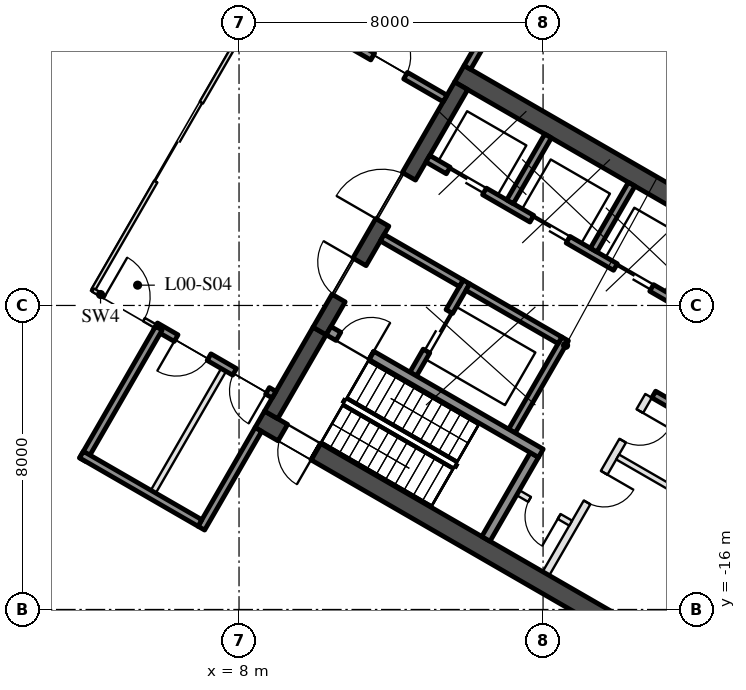
"""IFC4 building model, lengths in metres.
Left out: names, types, materials, properties, quantities, classifications, styles, units other than length and angle.
Written with IfcOpenShell. Run it as: python <this file> out.ifc"""

import sys

from ifc_helpers import new_model, si_unit, direction, frame, frame_2d, origin, origin_2d, place, context, subcontext, project, spatial, rectangle, extrude, element, fill, save


model = new_model("IFC4")
c1 = context("Model", 3, precision=1e-05, world=origin(), true_north=direction((0.0, 1.0)))
c2 = subcontext(c1, "Body", "Model", "MODEL_VIEW")
j1 = project(units=[si_unit("LENGTHUNIT", "METRE"), si_unit("PLANEANGLEUNIT", "RADIAN")], contexts=[c1])
p1 = place(None, origin())
s1 = spatial("IfcSite", under=j1, at=p1, CompositionType="ELEMENT")
p2 = place(p1, origin())
s2 = spatial("IfcBuilding", under=s1, at=p2, CompositionType="ELEMENT")
p3 = place(p2, origin())
s3 = spatial("IfcBuildingStorey", under=s2, at=p3, CompositionType="ELEMENT", Elevation=0.0)
p4 = place(p3, frame((13.797, -1.903, 0.0), z_axis=(0.0, 0.0, 1.0), x_axis=(0.866024264262, -0.500001973705, 0.0)))
e1 = element("IfcWall", 1, at=p4, inside=s3, PredefinedType="SHEAR", context=c2, shape_type="SweptSolid", body=[
    extrude(rectangle(XDim=15.6, YDim=0.5, at=frame_2d((7.8, 0.0))), origin(), (0.0, 0.0, 1.0), 8.7),
])
p5 = place(p3, frame((14.496, -14.143, 0.0), z_axis=(0.0, 0.0, 1.0), x_axis=(0.500062241894, 0.865989465428, 0.0)))
e2 = element("IfcWall", 2, at=p5, inside=s3, PredefinedType="SHEAR", context=c2, shape_type="SweptSolid", body=[
    extrude(rectangle(XDim=2.55, YDim=0.25, at=frame_2d((1.275, 0.0))), origin(), (0.0, 0.0, 1.0), 8.7),
])
p6 = place(p3, frame((15.181, -11.305, 0.0), z_axis=(0.0, 0.0, 1.0), x_axis=(0.49994636267, 0.866056369097, 0.0)))
e3 = element("IfcWall", 3, at=p6, inside=s3, PredefinedType="SHEAR", context=c2, shape_type="SweptSolid", body=[
    extrude(rectangle(XDim=2.8, YDim=0.2, at=frame_2d((1.4, 0.0))), origin(), (0.0, 0.0, 1.0), 8.7),
])
p7 = place(p3, frame((12.583, -9.805, 0.0), z_axis=(0.0, 0.0, 1.0), x_axis=(0.49994636267, 0.866056369097, 0.0)))
e4 = element("IfcWall", 4, at=p7, inside=s3, PredefinedType="SHEAR", context=c2, shape_type="SweptSolid", body=[
    extrude(rectangle(XDim=2.8, YDim=0.2, at=frame_2d((1.4, 0.0))), origin(), (0.0, 0.0, 1.0), 8.7),
])
p8 = place(p7, frame((0.7, 0.0, 0.0)))
e5 = element("IfcOpeningElement", 5, at=p8, cuts=e4, PredefinedType="OPENING", context=c2, shape_type="SweptSolid", body=[
    extrude(rectangle(XDim=1.2, YDim=2.1, at=frame_2d((0.6, 1.05))), frame((0.0, 0.11, 0.0), z_axis=(0.0, -1.0, 0.0), x_axis=(1.0, 0.0, 0.0)), (0.0, 0.0, 1.0), 0.22),
])
p9 = place(p3, frame((11.768, -6.217, 0.0), z_axis=(0.0, 0.0, 1.0), x_axis=(0.866050077142, -0.499957262057, 0.0)))
e6 = element("IfcWall", 6, at=p9, inside=s3, PredefinedType="SHEAR", context=c2, shape_type="SweptSolid", body=[
    extrude(rectangle(XDim=2.4, YDim=0.2, at=frame_2d((1.2, 0.0))), origin(), (0.0, 0.0, 1.0), 8.7),
])
p10 = place(p3, frame((14.02, -7.517, 0.0), z_axis=(0.0, 0.0, 1.0), x_axis=(0.866034573852, -0.49998411664, 0.0)))
e7 = element("IfcWall", 7, at=p10, inside=s3, PredefinedType="SHEAR", context=c2, shape_type="SweptSolid", body=[
    extrude(rectangle(XDim=2.8, YDim=0.2, at=frame_2d((1.4, 0.0))), origin(), (0.0, 0.0, 1.0), 8.7),
])
p11 = place(p3, frame((12.968, -4.138, 0.0), z_axis=(0.0, 0.0, 1.0), x_axis=(0.866028328073, -0.49999493495, 0.0)))
e8 = element("IfcWall", 8, at=p11, inside=s3, PredefinedType="SHEAR", context=c2, shape_type="SweptSolid", body=[
    extrude(rectangle(XDim=10.16, YDim=0.2, at=frame_2d((5.08, 0.0))), origin(), (0.0, 0.0, 1.0), 8.7),
])
p12 = place(p11, frame((0.62, 0.0, 0.0)))
e9 = element("IfcOpeningElement", 9, at=p12, cuts=e8, PredefinedType="OPENING", context=c2, shape_type="SweptSolid", body=[
    extrude(rectangle(XDim=1.1, YDim=2.1, at=frame_2d((0.55, 1.05))), frame((0.0, 0.11, 0.0), z_axis=(0.0, -1.0, 0.0), x_axis=(1.0, 0.0, 0.0)), (0.0, 0.0, 1.0), 0.22),
])
p13 = place(p11, frame((3.16, 0.0, 0.0)))
e10 = element("IfcOpeningElement", 10, at=p13, cuts=e8, PredefinedType="OPENING", context=c2, shape_type="SweptSolid", body=[
    extrude(rectangle(XDim=1.1, YDim=2.1, at=frame_2d((0.55, 1.05))), frame((0.0, 0.11, 0.0), z_axis=(0.0, -1.0, 0.0), x_axis=(1.0, 0.0, 0.0)), (0.0, 0.0, 1.0), 0.22),
])
p14 = place(p11, frame((5.7, 0.0, 0.0)))
e11 = element("IfcOpeningElement", 11, at=p14, cuts=e8, PredefinedType="OPENING", context=c2, shape_type="SweptSolid", body=[
    extrude(rectangle(XDim=1.1, YDim=2.1, at=frame_2d((0.55, 1.05))), frame((0.0, 0.11, 0.0), z_axis=(0.0, -1.0, 0.0), x_axis=(1.0, 0.0, 0.0)), (0.0, 0.0, 1.0), 0.22),
])
p15 = place(p11, frame((8.24, 0.0, 0.0)))
e12 = element("IfcOpeningElement", 12, at=p15, cuts=e8, PredefinedType="OPENING", context=c2, shape_type="SweptSolid", body=[
    extrude(rectangle(XDim=1.1, YDim=2.1, at=frame_2d((0.55, 1.05))), frame((0.0, 0.11, 0.0), z_axis=(0.0, -1.0, 0.0), x_axis=(1.0, 0.0, 0.0)), (0.0, 0.0, 1.0), 0.22),
])
p16 = place(p3, frame((18.913, -10.342, 0.0), z_axis=(0.0, 0.0, 1.0), x_axis=(0.866038183914, -0.499977863513, 0.0)))
e13 = element("IfcWall", 13, at=p16, inside=s3, PredefinedType="SHEAR", context=c2, shape_type="SweptSolid", body=[
    extrude(rectangle(XDim=1.71, YDim=0.2, at=frame_2d((0.855, 0.0))), origin(), (0.0, 0.0, 1.0), 8.7),
])
for number, where, z_axis, x_axis in (
    (14, (15.131, -5.272, 0.0), (0.0, 0.0, 1.0), (0.5, 0.866, 0.0)),
    (15, (17.331, -6.542, 0.0), (0.0, 0.0, 1.0), (0.5, 0.866, 0.0)),
):
    element("IfcWall", number, at=place(p3, frame(where, z_axis=z_axis, x_axis=x_axis)), inside=s3, PredefinedType="SHEAR", context=c2, shape_type="SweptSolid", body=[
        extrude(rectangle(XDim=2.0, YDim=0.2, at=frame_2d((1.0, 0.0))), origin(), (0.0, 0.0, 1.0), 8.7),
    ])
p17 = place(p3, frame((16.076, -15.055, 0.0), z_axis=(0.0, 0.0, 1.0), x_axis=(0.499995103361, 0.866028230842, 0.0)))
e16 = element("IfcWall", 16, at=p17, inside=s3, PredefinedType="PARTITIONING", context=c2, shape_type="SweptSolid", body=[
    extrude(rectangle(XDim=5.4, YDim=0.2, at=frame_2d((2.7, 0.0))), origin(), (0.0, 0.0, 1.0), 8.7),
])
p18 = place(p17, frame((2.163, 0.0, 0.0)))
e17 = element("IfcOpeningElement", 17, at=p18, cuts=e16, PredefinedType="OPENING", context=c2, shape_type="SweptSolid", body=[
    extrude(rectangle(XDim=0.9, YDim=2.1, at=frame_2d((0.45, 1.05))), frame((0.0, 0.11, 0.0), z_axis=(0.0, -1.0, 0.0), x_axis=(1.0, 0.0, 0.0)), (0.0, 0.0, 1.0), 0.22),
])
p19 = place(p17, frame((4.038, 0.0, 0.0)))
e18 = element("IfcOpeningElement", 18, at=p19, cuts=e16, PredefinedType="OPENING", context=c2, shape_type="SweptSolid", body=[
    extrude(rectangle(XDim=0.9, YDim=2.1, at=frame_2d((0.45, 1.05))), frame((0.0, 0.11, 0.0), z_axis=(0.0, -1.0, 0.0), x_axis=(1.0, 0.0, 0.0)), (0.0, 0.0, 1.0), 0.22),
])
p20 = place(p3, frame((15.342, -12.928, 0.0), z_axis=(0.0, 0.0, 1.0), x_axis=(0.865989903783, -0.500061482766, 0.0)))
e19 = element("IfcWall", 19, at=p20, inside=s3, PredefinedType="PARTITIONING", context=c2, shape_type="SweptSolid", body=[
    extrude(rectangle(XDim=1.6, YDim=0.15, at=frame_2d((0.8, 0.0))), origin(), (0.0, 0.0, 1.0), 8.7),
])
p21 = place(p20, frame((0.35, 0.0, 0.0)))
e20 = element("IfcOpeningElement", 20, at=p21, cuts=e19, PredefinedType="OPENING", context=c2, shape_type="SweptSolid", body=[
    extrude(rectangle(XDim=0.9, YDim=2.1, at=frame_2d((0.45, 1.05))), frame((0.0, 0.085, 0.0), z_axis=(0.0, -1.0, 0.0), x_axis=(1.0, 0.0, 0.0)), (0.0, 0.0, 1.0), 0.17),
])
p22 = place(p3, frame((17.963, -11.987, 0.0), z_axis=(0.0, 0.0, 1.0), x_axis=(0.866013608182, -0.500020430026, 0.0)))
e21 = element("IfcWall", 21, at=p22, inside=s3, PredefinedType="PARTITIONING", context=c2, shape_type="SweptSolid", body=[
    extrude(rectangle(XDim=4.35, YDim=0.15, at=frame_2d((2.175, 0.0))), origin(), (0.0, 0.0, 1.0), 8.7),
])
p23 = place(p3, frame((8.547, -10.997, 0.0), z_axis=(0.0, 0.0, 1.0), x_axis=(0.866033076574, -0.499986710104, 0.0)))
e22 = element("IfcWall", 22, at=p23, inside=s3, PredefinedType="SHEAR", context=c2, shape_type="SweptSolid", body=[
    extrude(rectangle(XDim=1.706, YDim=0.5, at=frame_2d((0.853, 0.0))), origin(), (0.0, 0.0, 1.0), 8.7),
])
p24 = place(p23, frame((0.7, 0.0, 0.0)))
e23 = element("IfcOpeningElement", 23, at=p24, cuts=e22, PredefinedType="OPENING", context=c2, shape_type="SweptSolid", body=[
    extrude(rectangle(XDim=1.0, YDim=2.1, at=frame_2d((0.5, 1.05))), frame((0.0, 0.26, 0.0), z_axis=(0.0, -1.0, 0.0), x_axis=(1.0, 0.0, 0.0)), (0.0, 0.0, 1.0), 0.52),
])
p25 = place(p3, frame((10.024, -11.85, 0.0), z_axis=(0.0, 0.0, 1.0), x_axis=(0.86602318214, -0.500003847982, 0.0)))
e24 = element("IfcWall", 24, at=p25, inside=s3, PredefinedType="SHEAR", context=c2, shape_type="SweptSolid", body=[
    extrude(rectangle(XDim=13.894, YDim=0.5, at=frame_2d((6.947, 0.0))), origin(), (0.0, 0.0, 1.0), 8.7),
])
p26 = place(p3, frame((8.845, -10.88, 0.0), z_axis=(0.0, 0.0, 1.0), x_axis=(0.499990435942, 0.866030925526, 0.0)))
e25 = element("IfcWall", 25, at=p26, inside=s3, PredefinedType="SHEAR", context=c2, shape_type="SweptSolid", body=[
    extrude(rectangle(XDim=2.55, YDim=0.4, at=frame_2d((1.275, 0.0))), origin(), (0.0, 0.0, 1.0), 8.7),
])
p27 = place(p3, frame((10.12, -8.672, 0.0), z_axis=(0.0, 0.0, 1.0), x_axis=(0.500008956979, 0.866020232408, 0.0)))
e26 = element("IfcWall", 26, at=p27, inside=s3, PredefinedType="SHEAR", context=c2, shape_type="SweptSolid", body=[
    extrude(rectangle(XDim=7.45, YDim=0.4, at=frame_2d((3.725, 0.0))), origin(), (0.0, 0.0, 1.0), 8.7),
])
p28 = place(p27, frame((1.0, 0.0, 0.0)))
e27 = element("IfcOpeningElement", 27, at=p28, cuts=e26, PredefinedType="OPENING", context=c2, shape_type="SweptSolid", body=[
    extrude(rectangle(XDim=1.1, YDim=2.1, at=frame_2d((0.55, 1.05))), frame((0.0, 0.21, 0.0), z_axis=(0.0, -1.0, 0.0), x_axis=(1.0, 0.0, 0.0)), (0.0, 0.0, 1.0), 0.42),
])
p29 = place(p27, frame((3.3, 0.0, 0.0)))
e28 = element("IfcOpeningElement", 28, at=p29, cuts=e26, PredefinedType="OPENING", context=c2, shape_type="SweptSolid", body=[
    extrude(rectangle(XDim=1.4, YDim=2.1, at=frame_2d((0.7, 1.05))), frame((0.0, 0.21, 0.0), z_axis=(0.0, -1.0, 0.0), x_axis=(1.0, 0.0, 0.0)), (0.0, 0.0, 1.0), 0.42),
])
p30 = place(p3, frame((10.356, -8.664, 0.0), z_axis=(0.0, 0.0, 1.0), x_axis=(0.866095317631, -0.499878886109, 0.0)))
e29 = element("IfcWall", 29, at=p30, inside=s3, PredefinedType="SHEAR", context=c2, shape_type="SweptSolid", body=[
    extrude(rectangle(XDim=1.306, YDim=0.25, at=frame_2d((0.653, 0.0))), origin(), (0.0, 0.0, 1.0), 8.7),
])
p31 = place(p30, frame((0.3, 0.0, 0.0)))
e30 = element("IfcOpeningElement", 30, at=p31, cuts=e29, PredefinedType="OPENING", context=c2, shape_type="SweptSolid", body=[
    extrude(rectangle(XDim=1.0, YDim=2.1, at=frame_2d((0.5, 1.05))), frame((0.0, 0.135, 0.0), z_axis=(0.0, -1.0, 0.0), x_axis=(1.0, 0.0, 0.0)), (0.0, 0.0, 1.0), 0.27),
])
p32 = place(p3, frame((11.487, -9.316, 0.0), z_axis=(0.0, 0.0, 1.0), x_axis=(0.866011695431, -0.500023742813, 0.0)))
e31 = element("IfcWall", 31, at=p32, inside=s3, PredefinedType="SHEAR", context=c2, shape_type="SweptSolid", body=[
    extrude(rectangle(XDim=5.144, YDim=0.25, at=frame_2d((2.572, 0.0))), origin(), (0.0, 0.0, 1.0), 8.7),
])
p33 = place(p3, frame((4.159, -7.597, 0.0), z_axis=(0.0, 0.0, 1.0), x_axis=(0.5000018851, 0.866024315419, 0.0)))
e32 = element("IfcWall", 32, at=p33, inside=s3, PredefinedType="PARTITIONING", context=c2, shape_type="SweptSolid", body=[
    extrude(rectangle(XDim=9.0, YDim=0.1, at=frame_2d((4.5, 0.0))), origin(), (0.0, 0.0, 1.0), 4.5),
])
p34 = place(p33, frame((3.3, 0.0, 0.0)))
e33 = element("IfcOpeningElement", 33, at=p34, cuts=e32, PredefinedType="OPENING", context=c2, shape_type="SweptSolid", body=[
    extrude(rectangle(XDim=2.4, YDim=2.4, at=frame_2d((1.2, 1.2))), frame((0.0, 0.06, 0.0), z_axis=(0.0, -1.0, 0.0), x_axis=(1.0, 0.0, 0.0)), (0.0, 0.0, 1.0), 0.12),
])
p35 = place(p3, frame((4.159, -7.597, 0.0), z_axis=(0.0, 0.0, 1.0), x_axis=(0.86601224135, -0.500022797313, 0.0)))
e34 = element("IfcWall", 34, at=p35, inside=s3, PredefinedType="PARTITIONING", context=c2, shape_type="SweptSolid", body=[
    extrude(rectangle(XDim=1.9, YDim=0.1, at=frame_2d((0.95, 0.0))), origin(), (0.0, 0.0, 1.0), 4.5),
])
p36 = place(p35, frame((0.35, 0.0, 0.0)))
e35 = element("IfcOpeningElement", 35, at=p36, cuts=e34, PredefinedType="OPENING", context=c2, shape_type="SweptSolid", body=[
    extrude(rectangle(XDim=1.2, YDim=2.4, at=frame_2d((0.6, 1.2))), frame((0.0, 0.06, 0.0), z_axis=(0.0, -1.0, 0.0), x_axis=(1.0, 0.0, 0.0)), (0.0, 0.0, 1.0), 0.12),
])
p37 = place(p3, frame((5.804, -8.547, 0.0), z_axis=(0.0, 0.0, 1.0), x_axis=(0.866018442252, -0.500012057535, 0.0)))
e36 = element("IfcWall", 36, at=p37, inside=s3, PredefinedType="SOLIDWALL", context=c2, shape_type="SweptSolid", body=[
    extrude(rectangle(XDim=3.6, YDim=0.2, at=frame_2d((1.8, 0.0))), origin(), (0.0, 0.0, 1.0), 4.5),
])
p38 = place(p37, frame((0.625, 0.0, 0.0)))
e37 = element("IfcOpeningElement", 37, at=p38, cuts=e36, PredefinedType="OPENING", context=c2, shape_type="SweptSolid", body=[
    extrude(rectangle(XDim=1.0, YDim=2.1, at=frame_2d((0.5, 1.05))), frame((0.0, 0.11, 0.0), z_axis=(0.0, -1.0, 0.0), x_axis=(1.0, 0.0, 0.0)), (0.0, 0.0, 1.0), 0.22),
])
p39 = place(p37, frame((2.4, 0.0, 0.0)))
e38 = element("IfcOpeningElement", 38, at=p39, cuts=e36, PredefinedType="OPENING", context=c2, shape_type="SweptSolid", body=[
    extrude(rectangle(XDim=1.0, YDim=2.1, at=frame_2d((0.5, 1.05))), frame((0.0, 0.11, 0.0), z_axis=(0.0, -1.0, 0.0), x_axis=(1.0, 0.0, 0.0)), (0.0, 0.0, 1.0), 0.22),
])
p40 = place(p3, frame((8.508, -11.263, 0.0), z_axis=(0.0, 0.0, 1.0), x_axis=(-0.50002537861, -0.866010750942, 0.0)))
e39 = element("IfcWall", 39, at=p40, inside=s3, PredefinedType="SOLIDWALL", context=c2, shape_type="SweptSolid", body=[
    extrude(rectangle(XDim=3.0, YDim=0.2, at=frame_2d((1.5, 0.0))), origin(), (0.0, 0.0, 1.0), 4.5),
])
p41 = place(p3, frame((5.891, -8.597, 0.0), z_axis=(0.0, 0.0, 1.0), x_axis=(-0.49999894854, -0.866026010844, 0.0)))
e40 = element("IfcWall", 40, at=p41, inside=s3, PredefinedType="SOLIDWALL", context=c2, shape_type="SweptSolid", body=[
    extrude(rectangle(XDim=4.0, YDim=0.2, at=frame_2d((2.0, 0.0))), origin(), (0.0, 0.0, 1.0), 4.5),
])
p42 = place(p3, frame((3.854, -11.925, 0.0), z_axis=(0.0, 0.0, 1.0), x_axis=(0.866018442252, -0.500012057535, 0.0)))
e41 = element("IfcWall", 41, at=p42, inside=s3, PredefinedType="SOLIDWALL", context=c2, shape_type="SweptSolid", body=[
    extrude(rectangle(XDim=3.6, YDim=0.2, at=frame_2d((1.8, 0.0))), origin(), (0.0, 0.0, 1.0), 4.5),
])
p43 = place(p3, frame((7.594, -9.696, 0.0), z_axis=(0.0, 0.0, 1.0), x_axis=(-0.499992827086, -0.866029545028, 0.0)))
e42 = element("IfcWall", 42, at=p43, inside=s3, PredefinedType="PARTITIONING", context=c2, shape_type="SweptSolid", body=[
    extrude(rectangle(XDim=3.7, YDim=0.15, at=frame_2d((1.85, 0.0))), origin(), (0.0, 0.0, 1.0), 4.5),
])
p44 = place(p3, frame((10.304, -0.753, 0.0), z_axis=(0.0, 0.0, 1.0), x_axis=(0.866018442252, -0.500012057535, 0.0)))
e43 = element("IfcWall", 43, at=p44, inside=s3, PredefinedType="SOLIDWALL", context=c2, shape_type="SweptSolid", body=[
    extrude(rectangle(XDim=3.6, YDim=0.2, at=frame_2d((1.8, 0.0))), origin(), (0.0, 0.0, 1.0), 4.5),
])
p45 = place(p44, frame((1.4, 0.0, 0.0)))
e44 = element("IfcOpeningElement", 44, at=p45, cuts=e43, PredefinedType="OPENING", context=c2, shape_type="SweptSolid", body=[
    extrude(rectangle(XDim=1.0, YDim=2.1, at=frame_2d((0.5, 1.05))), frame((0.0, 0.11, 0.0), z_axis=(0.0, -1.0, 0.0), x_axis=(1.0, 0.0, 0.0)), (0.0, 0.0, 1.0), 0.22),
])
p46 = place(p3, frame((14.008, -1.737, 0.0), z_axis=(0.0, 0.0, 1.0), x_axis=(0.50002537861, 0.866010750942, 0.0)))
e45 = element("IfcWall", 45, at=p46, inside=s3, PredefinedType="SOLIDWALL", context=c2, shape_type="SweptSolid", body=[
    extrude(rectangle(XDim=3.0, YDim=0.2, at=frame_2d((1.5, 0.0))), origin(), (0.0, 0.0, 1.0), 4.5),
])
p47 = place(p3, frame((2.945, -1.7, 0.0), z_axis=(0.0, 0.0, 1.0), x_axis=(0.5, 0.866025403784, 0.0)))
e46 = element("IfcWall", 46, at=p47, inside=s3, PredefinedType="SOLIDWALL", context=c2, shape_type="SweptSolid", body=[
    extrude(rectangle(XDim=3.0, YDim=1.2, at=origin_2d()), origin(), (0.0, 0.0, 1.0), 0.6),
])
p48 = place(p8, origin())
e47 = element("IfcDoor", 47, at=p48, inside=s3, OperationType="DOUBLE_DOOR_SLIDING", PredefinedType="DOOR", context=c2, shape_type="SweptSolid", body=[
    extrude(rectangle(XDim=1.2, YDim=2.1, at=frame_2d((0.6, 1.05))), frame((0.0, 0.025, 0.0), z_axis=(0.0, -1.0, 0.0), x_axis=(1.0, 0.0, 0.0)), (0.0, 0.0, 1.0), 0.05),
])
fill(e5, e47)
p49 = place(p21, frame((0.9, 0.0, 0.0), z_axis=(0.0, 0.0, 1.0), x_axis=(-1.0, 0.0, 0.0)))
e48 = element("IfcDoor", 48, at=p49, inside=s3, OperationType="SINGLE_SWING_LEFT", PredefinedType="DOOR", context=c2, shape_type="SweptSolid", body=[
    extrude(rectangle(XDim=0.9, YDim=2.1, at=frame_2d((0.45, 1.05))), frame((0.0, 0.025, 0.0), z_axis=(0.0, -1.0, 0.0), x_axis=(1.0, 0.0, 0.0)), (0.0, 0.0, 1.0), 0.05),
])
fill(e20, e48)
p50 = place(p12, origin())
e49 = element("IfcDoor", 49, at=p50, inside=s3, OperationType="DOUBLE_DOOR_SLIDING", PredefinedType="DOOR", context=c2, shape_type="SweptSolid", body=[
    extrude(rectangle(XDim=1.1, YDim=2.1, at=frame_2d((0.55, 1.05))), frame((0.0, 0.025, 0.0), z_axis=(0.0, -1.0, 0.0), x_axis=(1.0, 0.0, 0.0)), (0.0, 0.0, 1.0), 0.05),
])
fill(e9, e49)
p51 = place(p13, origin())
e50 = element("IfcDoor", 50, at=p51, inside=s3, OperationType="DOUBLE_DOOR_SLIDING", PredefinedType="DOOR", context=c2, shape_type="SweptSolid", body=[
    extrude(rectangle(XDim=1.1, YDim=2.1, at=frame_2d((0.55, 1.05))), frame((0.0, 0.025, 0.0), z_axis=(0.0, -1.0, 0.0), x_axis=(1.0, 0.0, 0.0)), (0.0, 0.0, 1.0), 0.05),
])
fill(e10, e50)
p52 = place(p14, origin())
e51 = element("IfcDoor", 51, at=p52, inside=s3, OperationType="DOUBLE_DOOR_SLIDING", PredefinedType="DOOR", context=c2, shape_type="SweptSolid", body=[
    extrude(rectangle(XDim=1.1, YDim=2.1, at=frame_2d((0.55, 1.05))), frame((0.0, 0.025, 0.0), z_axis=(0.0, -1.0, 0.0), x_axis=(1.0, 0.0, 0.0)), (0.0, 0.0, 1.0), 0.05),
])
fill(e11, e51)
p53 = place(p18, frame((0.9, 0.0, 0.0), z_axis=(0.0, 0.0, 1.0), x_axis=(-1.0, 0.0, 0.0)))
e52 = element("IfcDoor", 52, at=p53, inside=s3, OperationType="SINGLE_SWING_LEFT", PredefinedType="DOOR", context=c2, shape_type="SweptSolid", body=[
    extrude(rectangle(XDim=0.9, YDim=2.1, at=frame_2d((0.45, 1.05))), frame((0.0, 0.025, 0.0), z_axis=(0.0, -1.0, 0.0), x_axis=(1.0, 0.0, 0.0)), (0.0, 0.0, 1.0), 0.05),
])
fill(e17, e52)
p54 = place(p19, frame((0.9, 0.0, 0.0), z_axis=(0.0, 0.0, 1.0), x_axis=(-1.0, 0.0, 0.0)))
e53 = element("IfcDoor", 53, at=p54, inside=s3, OperationType="SINGLE_SWING_LEFT", PredefinedType="DOOR", context=c2, shape_type="SweptSolid", body=[
    extrude(rectangle(XDim=0.9, YDim=2.1, at=frame_2d((0.45, 1.05))), frame((0.0, 0.025, 0.0), z_axis=(0.0, -1.0, 0.0), x_axis=(1.0, 0.0, 0.0)), (0.0, 0.0, 1.0), 0.05),
])
fill(e18, e53)
p55 = place(p28, origin())
e54 = element("IfcDoor", 54, at=p55, inside=s3, OperationType="SINGLE_SWING_RIGHT", PredefinedType="DOOR", context=c2, shape_type="SweptSolid", body=[
    extrude(rectangle(XDim=1.1, YDim=2.1, at=frame_2d((0.55, 1.05))), frame((0.0, 0.025, 0.0), z_axis=(0.0, -1.0, 0.0), x_axis=(1.0, 0.0, 0.0)), (0.0, 0.0, 1.0), 0.05),
])
fill(e27, e54)
p56 = place(p29, origin())
e55 = element("IfcDoor", 55, at=p56, inside=s3, OperationType="DOUBLE_DOOR_SINGLE_SWING", PredefinedType="DOOR", context=c2, shape_type="SweptSolid", body=[
    extrude(rectangle(XDim=1.4, YDim=2.1, at=frame_2d((0.7, 1.05))), frame((0.0, 0.025, 0.0), z_axis=(0.0, -1.0, 0.0), x_axis=(1.0, 0.0, 0.0)), (0.0, 0.0, 1.0), 0.05),
])
fill(e28, e55)
p57 = place(p31, origin())
e56 = element("IfcDoor", 56, at=p57, inside=s3, OperationType="SINGLE_SWING_RIGHT", PredefinedType="DOOR", context=c2, shape_type="SweptSolid", body=[
    extrude(rectangle(XDim=1.0, YDim=2.1, at=frame_2d((0.5, 1.05))), frame((0.0, 0.025, 0.0), z_axis=(0.0, -1.0, 0.0), x_axis=(1.0, 0.0, 0.0)), (0.0, 0.0, 1.0), 0.05),
])
fill(e30, e56)
p58 = place(p24, frame((1.0, 0.0, 0.0), z_axis=(0.0, 0.0, 1.0), x_axis=(-1.0, 0.0, 0.0)))
e57 = element("IfcDoor", 57, at=p58, inside=s3, OperationType="SINGLE_SWING_LEFT", PredefinedType="DOOR", context=c2, shape_type="SweptSolid", body=[
    extrude(rectangle(XDim=1.0, YDim=2.1, at=frame_2d((0.5, 1.05))), frame((0.0, 0.025, 0.0), z_axis=(0.0, -1.0, 0.0), x_axis=(1.0, 0.0, 0.0)), (0.0, 0.0, 1.0), 0.05),
])
fill(e23, e57)
p59 = place(p34, origin())
e58 = element("IfcDoor", 58, at=p59, inside=s3, OperationType="DOUBLE_DOOR_SLIDING", PredefinedType="DOOR", context=c2, shape_type="SweptSolid", body=[
    extrude(rectangle(XDim=2.4, YDim=2.4, at=frame_2d((1.2, 1.2))), frame((0.0, 0.025, 0.0), z_axis=(0.0, -1.0, 0.0), x_axis=(1.0, 0.0, 0.0)), (0.0, 0.0, 1.0), 0.05),
])
fill(e33, e58)
p60 = place(p36, origin())
e59 = element("IfcDoor", 59, at=p60, inside=s3, OperationType="SINGLE_SWING_LEFT", PredefinedType="DOOR", context=c2, shape_type="SweptSolid", body=[
    extrude(rectangle(XDim=1.2, YDim=2.4, at=frame_2d((0.6, 1.2))), frame((0.0, 0.025, 0.0), z_axis=(0.0, -1.0, 0.0), x_axis=(1.0, 0.0, 0.0)), (0.0, 0.0, 1.0), 0.05),
])
fill(e35, e59)
p61 = place(p38, frame((1.0, 0.0, 0.0), z_axis=(0.0, 0.0, 1.0), x_axis=(-1.0, 0.0, 0.0)))
e60 = element("IfcDoor", 60, at=p61, inside=s3, OperationType="SINGLE_SWING_RIGHT", PredefinedType="DOOR", context=c2, shape_type="SweptSolid", body=[
    extrude(rectangle(XDim=1.0, YDim=2.1, at=frame_2d((0.5, 1.05))), frame((0.0, 0.025, 0.0), z_axis=(0.0, -1.0, 0.0), x_axis=(1.0, 0.0, 0.0)), (0.0, 0.0, 1.0), 0.05),
])
fill(e37, e60)
p62 = place(p39, frame((1.0, 0.0, 0.0), z_axis=(0.0, 0.0, 1.0), x_axis=(-1.0, 0.0, 0.0)))
e61 = element("IfcDoor", 61, at=p62, inside=s3, OperationType="SINGLE_SWING_LEFT", PredefinedType="DOOR", context=c2, shape_type="SweptSolid", body=[
    extrude(rectangle(XDim=1.0, YDim=2.1, at=frame_2d((0.5, 1.05))), frame((0.0, 0.025, 0.0), z_axis=(0.0, -1.0, 0.0), x_axis=(1.0, 0.0, 0.0)), (0.0, 0.0, 1.0), 0.05),
])
fill(e38, e61)
p63 = place(p45, origin())
e62 = element("IfcDoor", 62, at=p63, inside=s3, OperationType="SINGLE_SWING_LEFT", PredefinedType="DOOR", context=c2, shape_type="SweptSolid", body=[
    extrude(rectangle(XDim=1.0, YDim=2.1, at=frame_2d((0.5, 1.05))), frame((0.0, 0.025, 0.0), z_axis=(0.0, -1.0, 0.0), x_axis=(1.0, 0.0, 0.0)), (0.0, 0.0, 1.0), 0.05),
])
fill(e44, e62)
save(model, sys.argv[1])
